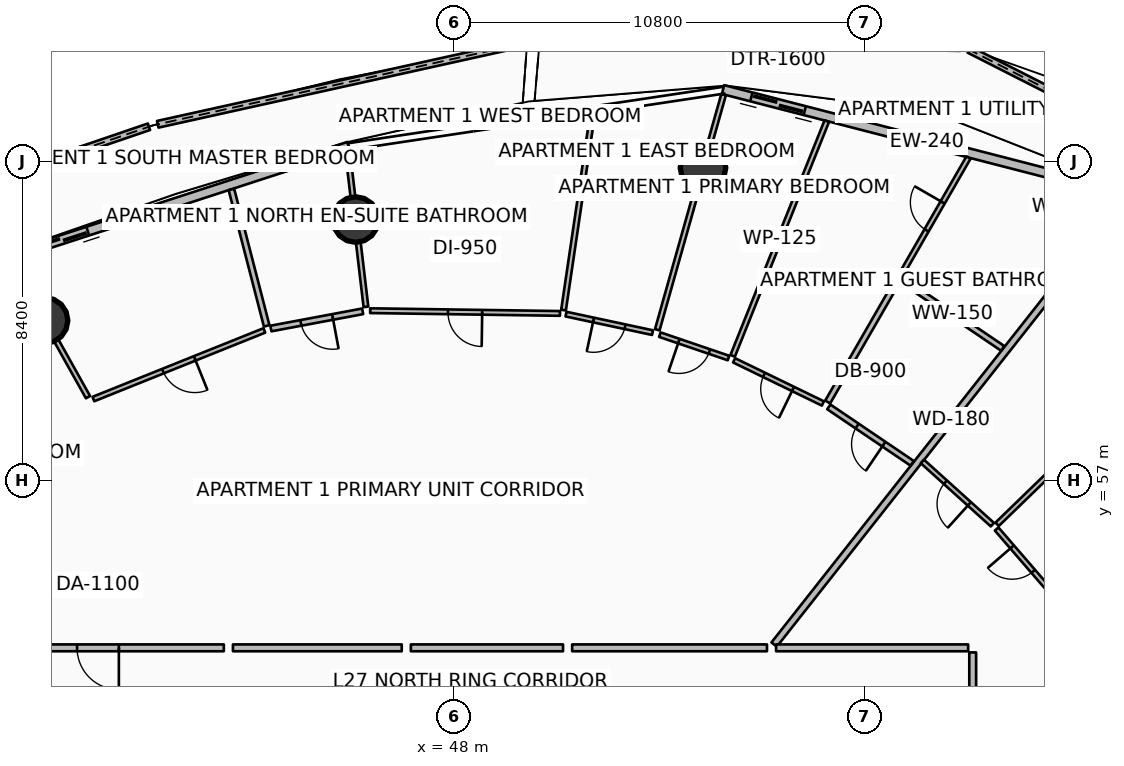
"""IFC4 building model, lengths in metres.
Left out: names, types, materials, properties, quantities, classifications, styles, units other than length and angle.
Written with IfcOpenShell. Run it as: python <this file> out.ifc"""

import sys

from ifc_helpers import new_model, si_unit, direction, frame, frame_2d, origin, origin_2d, place, context, subcontext, project, spatial, polyline, rectangle, circle, outline, extrude, element, fill, save


model = new_model("IFC4")
c1 = context("Model", 3, precision=1e-05, world=origin(), true_north=direction((0.0, 1.0)))
c2 = subcontext(c1, "Body", "Model", "MODEL_VIEW")
j1 = project(units=[si_unit("LENGTHUNIT", "METRE"), si_unit("PLANEANGLEUNIT", "RADIAN")], contexts=[c1])
p1 = place(None, origin())
s1 = spatial("IfcSite", under=j1, at=p1, CompositionType="ELEMENT")
p2 = place(p1, origin())
s2 = spatial("IfcBuilding", under=s1, at=p2, CompositionType="ELEMENT")
p3 = place(p2, frame((0.0, 0.0, 108.9)))
s3 = spatial("IfcBuildingStorey", under=s2, at=p3, CompositionType="ELEMENT", Elevation=108.9)
for number, where, z_axis, x_axis in (
    (1, (54.553, 65.234, 0.0), (0.0, 0.0, 1.0), (1.0, 0.0, 0.0)),
    (2, (45.412, 63.869, 0.0), (0.0, 0.0, 1.0), (1.0, 0.0, 0.0)),
    (3, (37.24, 61.214, 0.0), (0.0, 0.0, 1.0), (1.0, 0.0, 0.0)),
):
    element("IfcColumn", number, at=place(p3, frame(where, z_axis=z_axis, x_axis=x_axis)), inside=s3, PredefinedType="COLUMN", context=c2, shape_type="SweptSolid", body=[
        extrude(circle(Radius=0.6, at=origin_2d()), origin(), (0.0, 0.0, 1.0), 3.5),
    ])
p4 = place(p3, frame((72.201, 62.926, 0.0), z_axis=(0.0, 0.0, 1.0), x_axis=(-0.891327308183, 0.453360375074, 0.0)))
e4 = element("IfcWall", 4, at=p4, inside=s3, PredefinedType="PARAPET", context=c2, shape_type="SweptSolid", body=[
    extrude(outline(polyline([(0.0, 0.0), (11.943, 0.0), (11.942, 1.348), (5.971, 1.562), (0.0, 1.747), (0.0, 0.0)])), frame((0.0, 0.09, 0.0), z_axis=(0.0, -1.0, 0.0), x_axis=(1.0, 0.0, 0.0)), (0.0, 0.0, 1.0), 0.18),
])
p5 = place(p3, frame((49.925, 68.527, 0.0), z_axis=(0.0, 0.0, 1.0), x_axis=(-0.976378265654, -0.216068235423, 0.0)))
e5 = element("IfcWall", 5, at=p5, inside=s3, PredefinedType="PARAPET", context=c2, shape_type="SweptSolid", body=[
    extrude(outline(polyline([(0.0, 0.0), (9.955, 0.0), (9.955, 1.348), (4.977, 1.182), (0.0, 1.12), (0.0, 0.0)])), frame((0.0, 0.09, 0.0), z_axis=(0.0, -1.0, 0.0), x_axis=(1.0, 0.0, 0.0)), (0.0, 0.0, 1.0), 0.18),
])
p6 = place(p3, frame((39.975, 66.311, 0.0), z_axis=(0.0, 0.0, 1.0), x_axis=(-0.94637474678, -0.323070949881, 0.0)))
e6 = element("IfcWall", 6, at=p6, inside=s3, PredefinedType="PARAPET", context=c2, shape_type="SweptSolid", body=[
    extrude(outline(polyline([(0.0, 0.0), (10.241, 0.0), (10.241, 1.747), (5.121, 1.562), (0.0, 1.348), (0.0, 0.0)])), frame((0.0, 0.09, 0.0), z_axis=(0.0, -1.0, 0.0), x_axis=(1.0, 0.0, 0.0)), (0.0, 0.0, 1.0), 0.18),
])
p7 = place(p3, frame((65.814, 64.523, 0.0), z_axis=(0.0, 0.0, 1.0), x_axis=(-0.968356180858, 0.249572248045, 0.0)))
e7 = element("IfcWall", 7, at=p7, inside=s3, PredefinedType="SOLIDWALL", context=c2, shape_type="SweptSolid", body=[
    extrude(rectangle(XDim=11.084, YDim=0.24, at=frame_2d((5.542, 0.0))), origin(), (0.0, 0.0, 1.0), 2.45),
])
p8 = place(p7, frame((8.865, 0.0, 0.0)))
e8 = element("IfcOpeningElement", 8, at=p8, cuts=e7, PredefinedType="OPENING", context=c2, shape_type="SweptSolid", body=[
    extrude(rectangle(XDim=1.45, YDim=2.15, at=frame_2d((0.725, 1.075))), frame((0.0, 0.13, 0.0), z_axis=(0.0, -1.0, 0.0), x_axis=(1.0, 0.0, 0.0)), (0.0, 0.0, 1.0), 0.26),
])
p9 = place(p7, frame((0.28, 0.0, 0.65)))
e9 = element("IfcOpeningElement", 9, at=p9, cuts=e7, PredefinedType="OPENING", context=c2, shape_type="SweptSolid", body=[
    extrude(rectangle(XDim=1.6, YDim=1.5, at=frame_2d((0.8, 0.75))), frame((0.0, 0.13, 0.0), z_axis=(0.0, -1.0, 0.0), x_axis=(1.0, 0.0, 0.0)), (0.0, 0.0, 1.0), 0.26),
])
p10 = place(p3, frame((45.233, 65.797, 0.0), z_axis=(0.0, 0.0, 1.0), x_axis=(-0.951052494852, -0.30902937083, 0.0)))
e10 = element("IfcWall", 10, at=p10, inside=s3, PredefinedType="SOLIDWALL", context=c2, shape_type="SweptSolid", body=[
    extrude(rectangle(XDim=9.444, YDim=0.24, at=frame_2d((4.722, 0.0))), origin(), (0.0, 0.0, 1.0), 2.45),
])
p11 = place(p10, frame((7.224, 0.0, 0.0)))
e11 = element("IfcOpeningElement", 11, at=p11, cuts=e10, PredefinedType="OPENING", context=c2, shape_type="SweptSolid", body=[
    extrude(rectangle(XDim=1.45, YDim=2.15, at=frame_2d((0.725, 1.075))), frame((0.0, 0.13, 0.0), z_axis=(0.0, -1.0, 0.0), x_axis=(1.0, 0.0, 0.0)), (0.0, 0.0, 1.0), 0.26),
])
p12 = place(p10, frame((0.28, 0.0, 0.65)))
e12 = element("IfcOpeningElement", 12, at=p12, cuts=e10, PredefinedType="OPENING", context=c2, shape_type="SweptSolid", body=[
    extrude(rectangle(XDim=1.6, YDim=1.5, at=frame_2d((0.8, 0.75))), frame((0.0, 0.13, 0.0), z_axis=(0.0, -1.0, 0.0), x_axis=(1.0, 0.0, 0.0)), (0.0, 0.0, 1.0), 0.26),
])
p13 = place(p3, frame((56.425, 52.686, 0.0), z_axis=(0.0, 0.0, 1.0), x_axis=(0.619083417853, 0.785325233098, 0.0)))
e13 = element("IfcWall", 13, at=p13, inside=s3, PredefinedType="PARTITIONING", context=c2, shape_type="SweptSolid", body=[
    extrude(rectangle(XDim=15.063, YDim=0.18, at=frame_2d((7.532, 0.0))), origin(), (0.0, 0.0, 1.0), 2.94),
])
p14 = place(p3, frame((41.944, 52.6, 0.0), z_axis=(0.0, 0.0, 1.0), x_axis=(-1.0, 0.0, 0.0)))
e14 = element("IfcWall", 14, at=p14, inside=s3, PredefinedType="PARTITIONING", context=c2, shape_type="SweptSolid", body=[
    extrude(rectangle(XDim=6.624, YDim=0.18, at=frame_2d((3.312, 0.0))), origin(), (0.0, 0.0, 1.0), 2.94),
])
p15 = place(p14, frame((2.762, 0.0, 0.0)))
e15 = element("IfcOpeningElement", 15, at=p15, cuts=e14, PredefinedType="OPENING", context=c2, shape_type="SweptSolid", body=[
    extrude(rectangle(XDim=1.1, YDim=2.1, at=frame_2d((0.55, 1.05))), frame((0.0, 0.1, 0.0), z_axis=(0.0, -1.0, 0.0), x_axis=(1.0, 0.0, 0.0)), (0.0, 0.0, 1.0), 0.2),
])
p16 = place(p3, frame((56.236, 52.6, 0.0), z_axis=(0.0, 0.0, 1.0), x_axis=(-1.0, 0.0, 0.0)))
e16 = element("IfcWall", 16, at=p16, inside=s3, PredefinedType="PARTITIONING", context=c2, shape_type="SweptSolid", body=[
    extrude(rectangle(XDim=5.127, YDim=0.18, at=frame_2d((2.563, 0.0))), origin(), (0.0, 0.0, 1.0), 2.94),
])
p17 = place(p3, frame((60.057, 57.455, 0.0), z_axis=(0.0, 0.0, 1.0), x_axis=(-0.828073269886, 0.560619888783, 0.0)))
e17 = element("IfcWall", 17, at=p17, inside=s3, PredefinedType="PARTITIONING", context=c2, shape_type="SweptSolid", body=[
    extrude(rectangle(XDim=2.649, YDim=0.15, at=frame_2d((1.324, 0.0))), origin(), (0.0, 0.0, 1.0), 2.94),
])
p18 = place(p17, frame((0.899, 0.0, 0.0)))
e18 = element("IfcOpeningElement", 18, at=p18, cuts=e17, PredefinedType="OPENING", context=c2, shape_type="SweptSolid", body=[
    extrude(rectangle(XDim=0.85, YDim=2.06, at=frame_2d((0.425, 1.03))), frame((0.0, 0.085, 0.0), z_axis=(0.0, -1.0, 0.0), x_axis=(1.0, 0.0, 0.0)), (0.0, 0.0, 1.0), 0.17),
])
p19 = place(p3, frame((62.44, 60.479, 0.0), z_axis=(0.0, 0.0, 1.0), x_axis=(-0.828057808374, 0.560642725798, 0.0)))
e19 = element("IfcWall", 19, at=p19, inside=s3, PredefinedType="PARTITIONING", context=c2, shape_type="SweptSolid", body=[
    extrude(rectangle(XDim=3.206, YDim=0.15, at=frame_2d((1.603, 0.0))), origin(), (0.0, 0.0, 1.0), 2.94),
])
p20 = place(p3, frame((57.834, 59.069, 0.0), z_axis=(0.0, 0.0, 1.0), x_axis=(0.49925269443, 0.866456431164, 0.0)))
e20 = element("IfcWall", 20, at=p20, inside=s3, PredefinedType="PARTITIONING", context=c2, shape_type="SweptSolid", body=[
    extrude(rectangle(XDim=3.72, YDim=0.15, at=frame_2d((1.86, 0.0))), origin(), (0.0, 0.0, 1.0), 2.94),
])
p21 = place(p3, frame((59.756, 62.405, 0.0), z_axis=(0.0, 0.0, 1.0), x_axis=(0.499189934721, 0.866492590316, 0.0)))
e21 = element("IfcWall", 21, at=p21, inside=s3, PredefinedType="PARTITIONING", context=c2, shape_type="SweptSolid", body=[
    extrude(rectangle(XDim=3.573, YDim=0.125, at=frame_2d((1.786, 0.0))), origin(), (0.0, 0.0, 1.0), 2.94),
])
p22 = place(p21, frame((1.361, 0.0, 0.0)))
e22 = element("IfcOpeningElement", 22, at=p22, cuts=e21, PredefinedType="OPENING", context=c2, shape_type="SweptSolid", body=[
    extrude(rectangle(XDim=0.85, YDim=2.06, at=frame_2d((0.425, 1.03))), frame((0.0, 0.073, 0.0), z_axis=(0.0, -1.0, 0.0), x_axis=(1.0, 0.0, 0.0)), (0.0, 0.0, 1.0), 0.145),
])
p23 = place(p3, frame((55.333, 60.283, 0.0), z_axis=(0.0, 0.0, 1.0), x_axis=(0.372282601369, 0.928119423737, 0.0)))
e23 = element("IfcWall", 23, at=p23, inside=s3, PredefinedType="PARTITIONING", context=c2, shape_type="SweptSolid", body=[
    extrude(rectangle(XDim=6.653, YDim=0.125, at=frame_2d((3.327, 0.0))), origin(), (0.0, 0.0, 1.0), 2.94),
])
p24 = place(p3, frame((57.708, 59.03, 0.0), z_axis=(0.0, 0.0, 1.0), x_axis=(-0.899555648673, 0.436806175484, 0.0)))
e24 = element("IfcWall", 24, at=p24, inside=s3, PredefinedType="PARTITIONING", context=c2, shape_type="SweptSolid", body=[
    extrude(rectangle(XDim=2.597, YDim=0.125, at=frame_2d((1.299, 0.0))), origin(), (0.0, 0.0, 1.0), 2.94),
])
p25 = place(p24, frame((0.874, 0.0, 0.0)))
e25 = element("IfcOpeningElement", 25, at=p25, cuts=e24, PredefinedType="OPENING", context=c2, shape_type="SweptSolid", body=[
    extrude(rectangle(XDim=0.85, YDim=2.06, at=frame_2d((0.425, 1.03))), frame((0.0, 0.073, 0.0), z_axis=(0.0, -1.0, 0.0), x_axis=(1.0, 0.0, 0.0)), (0.0, 0.0, 1.0), 0.145),
])
p26 = place(p3, frame((55.224, 60.226, 0.0), z_axis=(0.0, 0.0, 1.0), x_axis=(-0.946642431702, 0.322285752866, 0.0)))
e26 = element("IfcWall", 26, at=p26, inside=s3, PredefinedType="PARTITIONING", context=c2, shape_type="SweptSolid", body=[
    extrude(rectangle(XDim=1.908, YDim=0.125, at=frame_2d((0.954, 0.0))), origin(), (0.0, 0.0, 1.0), 2.94),
])
p27 = place(p26, frame((0.529, 0.0, 0.0)))
e27 = element("IfcOpeningElement", 27, at=p27, cuts=e26, PredefinedType="OPENING", context=c2, shape_type="SweptSolid", body=[
    extrude(rectangle(XDim=0.85, YDim=2.06, at=frame_2d((0.425, 1.03))), frame((0.0, 0.073, 0.0), z_axis=(0.0, -1.0, 0.0), x_axis=(1.0, 0.0, 0.0)), (0.0, 0.0, 1.0), 0.145),
])
p28 = place(p3, frame((50.869, 52.6, 0.0), z_axis=(0.0, 0.0, 1.0), x_axis=(-1.0, 0.0, 0.0)))
e28 = element("IfcWall", 28, at=p28, inside=s3, PredefinedType="PARTITIONING", context=c2, shape_type="SweptSolid", body=[
    extrude(rectangle(XDim=4.004, YDim=0.18, at=frame_2d((2.002, 0.0))), origin(), (0.0, 0.0, 1.0), 2.94),
])
p29 = place(p3, frame((53.35, 60.969, 0.0), z_axis=(0.0, 0.0, 1.0), x_axis=(0.271449341275, 0.962452728772, 0.0)))
e29 = element("IfcWall", 29, at=p29, inside=s3, PredefinedType="PARTITIONING", context=c2, shape_type="SweptSolid", body=[
    extrude(rectangle(XDim=6.429, YDim=0.125, at=frame_2d((3.214, 0.0))), origin(), (0.0, 0.0, 1.0), 2.94),
])
p30 = place(p3, frame((50.883, 61.487, 0.0), z_axis=(0.0, 0.0, 1.0), x_axis=(0.146319984384, 0.989237313373, 0.0)))
e30 = element("IfcWall", 30, at=p30, inside=s3, PredefinedType="PARTITIONING", context=c2, shape_type="SweptSolid", body=[
    extrude(rectangle(XDim=5.301, YDim=0.125, at=frame_2d((2.65, 0.0))), origin(), (0.0, 0.0, 1.0), 2.94),
])
p31 = place(p3, frame((53.225, 60.894, 0.0), z_axis=(0.0, 0.0, 1.0), x_axis=(-0.977859146171, 0.209264163799, 0.0)))
e31 = element("IfcWall", 31, at=p31, inside=s3, PredefinedType="PARTITIONING", context=c2, shape_type="SweptSolid", body=[
    extrude(rectangle(XDim=2.329, YDim=0.125, at=frame_2d((1.164, 0.0))), origin(), (0.0, 0.0, 1.0), 2.94),
])
p32 = place(p31, frame((0.739, 0.0, 0.0)))
e32 = element("IfcOpeningElement", 32, at=p32, cuts=e31, PredefinedType="OPENING", context=c2, shape_type="SweptSolid", body=[
    extrude(rectangle(XDim=0.85, YDim=2.06, at=frame_2d((0.425, 1.03))), frame((0.0, 0.073, 0.0), z_axis=(0.0, -1.0, 0.0), x_axis=(1.0, 0.0, 0.0)), (0.0, 0.0, 1.0), 0.145),
])
p33 = place(p3, frame((50.79, 61.399, 0.0), z_axis=(0.0, 0.0, 1.0), x_axis=(-0.999894626753, 0.014516727973, 0.0)))
e33 = element("IfcWall", 33, at=p33, inside=s3, PredefinedType="PARTITIONING", context=c2, shape_type="SweptSolid", body=[
    extrude(rectangle(XDim=4.995, YDim=0.125, at=frame_2d((2.498, 0.0))), origin(), (0.0, 0.0, 1.0), 2.94),
])
p34 = place(p33, frame((2.048, 0.0, 0.0)))
e34 = element("IfcOpeningElement", 34, at=p34, cuts=e33, PredefinedType="OPENING", context=c2, shape_type="SweptSolid", body=[
    extrude(rectangle(XDim=0.9, YDim=2.08, at=frame_2d((0.45, 1.04))), frame((0.0, 0.073, 0.0), z_axis=(0.0, -1.0, 0.0), x_axis=(1.0, 0.0, 0.0)), (0.0, 0.0, 1.0), 0.145),
])
p35 = place(p3, frame((46.625, 52.6, 0.0), z_axis=(0.0, 0.0, 1.0), x_axis=(-1.0, 0.0, 0.0)))
e35 = element("IfcWall", 35, at=p35, inside=s3, PredefinedType="PARTITIONING", context=c2, shape_type="SweptSolid", body=[
    extrude(rectangle(XDim=4.442, YDim=0.18, at=frame_2d((2.221, 0.0))), origin(), (0.0, 0.0, 1.0), 2.94),
])
p36 = place(p3, frame((45.683, 61.573, 0.0), z_axis=(0.0, 0.0, 1.0), x_axis=(-0.117513626782, 0.993071270111, 0.0)))
e36 = element("IfcWall", 36, at=p36, inside=s3, PredefinedType="PARTITIONING", context=c2, shape_type="SweptSolid", body=[
    extrude(rectangle(XDim=4.213, YDim=0.125, at=frame_2d((2.107, 0.0))), origin(), (0.0, 0.0, 1.0), 2.94),
])
p37 = place(p3, frame((38.37, 59.196, 0.0), z_axis=(0.0, 0.0, 1.0), x_axis=(-0.488603368932, 0.87250601595, 0.0)))
e37 = element("IfcWall", 37, at=p37, inside=s3, PredefinedType="PARTITIONING", context=c2, shape_type="SweptSolid", body=[
    extrude(rectangle(XDim=4.113, YDim=0.125, at=frame_2d((2.057, 0.0))), origin(), (0.0, 0.0, 1.0), 2.94),
])
p38 = place(p3, frame((45.597, 61.455, 0.0), z_axis=(0.0, 0.0, 1.0), x_axis=(-0.982882310082, -0.18423453674, 0.0)))
e38 = element("IfcWall", 38, at=p38, inside=s3, PredefinedType="PARTITIONING", context=c2, shape_type="SweptSolid", body=[
    extrude(rectangle(XDim=2.457, YDim=0.15, at=frame_2d((1.229, 0.0))), origin(), (0.0, 0.0, 1.0), 2.94),
])
p39 = place(p38, frame((0.803, 0.0, 0.0)))
e39 = element("IfcOpeningElement", 39, at=p39, cuts=e38, PredefinedType="OPENING", context=c2, shape_type="SweptSolid", body=[
    extrude(rectangle(XDim=0.85, YDim=2.06, at=frame_2d((0.425, 1.03))), frame((0.0, 0.085, 0.0), z_axis=(0.0, -1.0, 0.0), x_axis=(1.0, 0.0, 0.0)), (0.0, 0.0, 1.0), 0.17),
])
p40 = place(p3, frame((43.071, 61.073, 0.0), z_axis=(0.0, 0.0, 1.0), x_axis=(-0.250228515302, 0.968186805389, 0.0)))
e40 = element("IfcWall", 40, at=p40, inside=s3, PredefinedType="PARTITIONING", context=c2, shape_type="SweptSolid", body=[
    extrude(rectangle(XDim=3.708, YDim=0.15, at=frame_2d((1.854, 0.0))), origin(), (0.0, 0.0, 1.0), 2.94),
])
p41 = place(p3, frame((43.01, 60.952, 0.0), z_axis=(0.0, 0.0, 1.0), x_axis=(-0.9280140097, -0.372545296307, 0.0)))
e41 = element("IfcWall", 41, at=p41, inside=s3, PredefinedType="PARTITIONING", context=c2, shape_type="SweptSolid", body=[
    extrude(rectangle(XDim=4.847, YDim=0.125, at=frame_2d((2.424, 0.0))), origin(), (0.0, 0.0, 1.0), 2.94),
])
p42 = place(p41, frame((1.974, 0.0, 0.0)))
e42 = element("IfcOpeningElement", 42, at=p42, cuts=e41, PredefinedType="OPENING", context=c2, shape_type="SweptSolid", body=[
    extrude(rectangle(XDim=0.9, YDim=2.08, at=frame_2d((0.45, 1.04))), frame((0.0, 0.073, 0.0), z_axis=(0.0, -1.0, 0.0), x_axis=(1.0, 0.0, 0.0)), (0.0, 0.0, 1.0), 0.145),
])
p43 = place(p3, frame((61.65, 49.764, 0.0), z_axis=(0.0, 0.0, 1.0), x_axis=(0.0, 1.0, 0.0)))
e43 = element("IfcWall", 43, at=p43, inside=s3, PredefinedType="PARTITIONING", context=c2, shape_type="SweptSolid", body=[
    extrude(rectangle(XDim=2.716, YDim=0.18, at=frame_2d((1.358, 0.0))), origin(), (0.0, 0.0, 1.0), 2.94),
])
p44 = place(p3, frame((61.53, 52.6, 0.0), z_axis=(0.0, 0.0, 1.0), x_axis=(-1.0, 0.0, 0.0)))
e44 = element("IfcWall", 44, at=p44, inside=s3, PredefinedType="PARTITIONING", context=c2, shape_type="SweptSolid", body=[
    extrude(rectangle(XDim=5.054, YDim=0.18, at=frame_2d((2.527, 0.0))), origin(), (0.0, 0.0, 1.0), 2.94),
])
p45 = place(p3, frame((62.292, 55.85, 0.0), z_axis=(0.0, 0.0, 1.0), x_axis=(0.718126885769, 0.695912189817, 0.0)))
e45 = element("IfcWall", 45, at=p45, inside=s3, PredefinedType="PARTITIONING", context=c2, shape_type="SweptSolid", body=[
    extrude(rectangle(XDim=8.781, YDim=0.125, at=frame_2d((4.391, 0.0))), origin(), (0.0, 0.0, 1.0), 2.94),
])
p46 = place(p3, frame((63.65, 54.142, 0.0), z_axis=(0.0, 0.0, 1.0), x_axis=(-0.65397173696, 0.756518980104, 0.0)))
e46 = element("IfcWall", 46, at=p46, inside=s3, PredefinedType="PARTITIONING", context=c2, shape_type="SweptSolid", body=[
    extrude(rectangle(XDim=2.095, YDim=0.125, at=frame_2d((1.047, 0.0))), origin(), (0.0, 0.0, 1.0), 2.94),
])
p47 = place(p46, frame((0.623, 0.0, 0.0)))
e47 = element("IfcOpeningElement", 47, at=p47, cuts=e46, PredefinedType="OPENING", context=c2, shape_type="SweptSolid", body=[
    extrude(rectangle(XDim=0.85, YDim=2.06, at=frame_2d((0.425, 1.03))), frame((0.0, 0.073, 0.0), z_axis=(0.0, -1.0, 0.0), x_axis=(1.0, 0.0, 0.0)), (0.0, 0.0, 1.0), 0.145),
])
p48 = place(p3, frame((62.168, 55.841, 0.0), z_axis=(0.0, 0.0, 1.0), x_axis=(-0.742266682882, 0.67010459742, 0.0)))
e48 = element("IfcWall", 48, at=p48, inside=s3, PredefinedType="PARTITIONING", context=c2, shape_type="SweptSolid", body=[
    extrude(rectangle(XDim=2.483, YDim=0.125, at=frame_2d((1.242, 0.0))), origin(), (0.0, 0.0, 1.0), 2.94),
])
p49 = place(p48, frame((0.817, 0.0, 0.0)))
e49 = element("IfcOpeningElement", 49, at=p49, cuts=e48, PredefinedType="OPENING", context=c2, shape_type="SweptSolid", body=[
    extrude(rectangle(XDim=0.85, YDim=2.06, at=frame_2d((0.425, 1.03))), frame((0.0, 0.073, 0.0), z_axis=(0.0, -1.0, 0.0), x_axis=(1.0, 0.0, 0.0)), (0.0, 0.0, 1.0), 0.145),
])
p50 = place(p8, origin())
e50 = element("IfcDoor", 50, at=p50, inside=s3, OperationType="DOUBLE_DOOR_SLIDING", PredefinedType="DOOR", context=c2, shape_type="SweptSolid", body=[
    extrude(rectangle(XDim=1.45, YDim=2.15, at=frame_2d((0.725, 1.075))), frame((0.0, 0.025, 0.0), z_axis=(0.0, -1.0, 0.0), x_axis=(1.0, 0.0, 0.0)), (0.0, 0.0, 1.0), 0.05),
])
fill(e8, e50)
p51 = place(p11, origin())
e51 = element("IfcDoor", 51, at=p51, inside=s3, OperationType="DOUBLE_DOOR_SLIDING", PredefinedType="DOOR", context=c2, shape_type="SweptSolid", body=[
    extrude(rectangle(XDim=1.45, YDim=2.15, at=frame_2d((0.725, 1.075))), frame((0.0, 0.025, 0.0), z_axis=(0.0, -1.0, 0.0), x_axis=(1.0, 0.0, 0.0)), (0.0, 0.0, 1.0), 0.05),
])
fill(e11, e51)
p52 = place(p12, origin())
e52 = element("IfcWindow", 52, at=p52, inside=s3, PartitioningType="SINGLE_PANEL", PredefinedType="WINDOW", context=c2, shape_type="SweptSolid", body=[
    extrude(rectangle(XDim=1.6, YDim=1.5, at=frame_2d((0.8, 0.75))), frame((0.0, 0.03, 0.0), z_axis=(0.0, -1.0, 0.0), x_axis=(1.0, 0.0, 0.0)), (0.0, 0.0, 1.0), 0.06),
])
fill(e12, e52)
p53 = place(p15, origin())
e53 = element("IfcDoor", 53, at=p53, inside=s3, OperationType="SINGLE_SWING_LEFT", PredefinedType="DOOR", context=c2, shape_type="SweptSolid", body=[
    extrude(rectangle(XDim=1.1, YDim=2.1, at=frame_2d((0.55, 1.05))), frame((0.0, 0.025, 0.0), z_axis=(0.0, -1.0, 0.0), x_axis=(1.0, 0.0, 0.0)), (0.0, 0.0, 1.0), 0.05),
])
fill(e15, e53)
p54 = place(p18, origin())
e54 = element("IfcDoor", 54, at=p54, inside=s3, OperationType="SINGLE_SWING_LEFT", PredefinedType="DOOR", context=c2, shape_type="SweptSolid", body=[
    extrude(rectangle(XDim=0.85, YDim=2.06, at=frame_2d((0.425, 1.03))), frame((0.0, 0.025, 0.0), z_axis=(0.0, -1.0, 0.0), x_axis=(1.0, 0.0, 0.0)), (0.0, 0.0, 1.0), 0.05),
])
fill(e18, e54)
p55 = place(p22, origin())
e55 = element("IfcDoor", 55, at=p55, inside=s3, OperationType="SINGLE_SWING_RIGHT", PredefinedType="DOOR", context=c2, shape_type="SweptSolid", body=[
    extrude(rectangle(XDim=0.85, YDim=2.06, at=frame_2d((0.425, 1.03))), frame((0.0, 0.025, 0.0), z_axis=(0.0, -1.0, 0.0), x_axis=(1.0, 0.0, 0.0)), (0.0, 0.0, 1.0), 0.05),
])
fill(e22, e55)
p56 = place(p25, origin())
e56 = element("IfcDoor", 56, at=p56, inside=s3, OperationType="SINGLE_SWING_LEFT", PredefinedType="DOOR", context=c2, shape_type="SweptSolid", body=[
    extrude(rectangle(XDim=0.85, YDim=2.06, at=frame_2d((0.425, 1.03))), frame((0.0, 0.025, 0.0), z_axis=(0.0, -1.0, 0.0), x_axis=(1.0, 0.0, 0.0)), (0.0, 0.0, 1.0), 0.05),
])
fill(e25, e56)
p57 = place(p27, origin())
e57 = element("IfcDoor", 57, at=p57, inside=s3, OperationType="SINGLE_SWING_RIGHT", PredefinedType="DOOR", context=c2, shape_type="SweptSolid", body=[
    extrude(rectangle(XDim=0.85, YDim=2.06, at=frame_2d((0.425, 1.03))), frame((0.0, 0.025, 0.0), z_axis=(0.0, -1.0, 0.0), x_axis=(1.0, 0.0, 0.0)), (0.0, 0.0, 1.0), 0.05),
])
fill(e27, e57)
p58 = place(p32, origin())
e58 = element("IfcDoor", 58, at=p58, inside=s3, OperationType="SINGLE_SWING_RIGHT", PredefinedType="DOOR", context=c2, shape_type="SweptSolid", body=[
    extrude(rectangle(XDim=0.85, YDim=2.06, at=frame_2d((0.425, 1.03))), frame((0.0, 0.025, 0.0), z_axis=(0.0, -1.0, 0.0), x_axis=(1.0, 0.0, 0.0)), (0.0, 0.0, 1.0), 0.05),
])
fill(e32, e58)
p59 = place(p34, origin())
e59 = element("IfcDoor", 59, at=p59, inside=s3, OperationType="SINGLE_SWING_LEFT", PredefinedType="DOOR", context=c2, shape_type="SweptSolid", body=[
    extrude(rectangle(XDim=0.9, YDim=2.08, at=frame_2d((0.45, 1.04))), frame((0.0, 0.025, 0.0), z_axis=(0.0, -1.0, 0.0), x_axis=(1.0, 0.0, 0.0)), (0.0, 0.0, 1.0), 0.05),
])
fill(e34, e59)
p60 = place(p39, origin())
e60 = element("IfcDoor", 60, at=p60, inside=s3, OperationType="SINGLE_SWING_LEFT", PredefinedType="DOOR", context=c2, shape_type="SweptSolid", body=[
    extrude(rectangle(XDim=0.85, YDim=2.06, at=frame_2d((0.425, 1.03))), frame((0.0, 0.025, 0.0), z_axis=(0.0, -1.0, 0.0), x_axis=(1.0, 0.0, 0.0)), (0.0, 0.0, 1.0), 0.05),
])
fill(e39, e60)
p61 = place(p42, origin())
e61 = element("IfcDoor", 61, at=p61, inside=s3, OperationType="SINGLE_SWING_LEFT", PredefinedType="DOOR", context=c2, shape_type="SweptSolid", body=[
    extrude(rectangle(XDim=0.9, YDim=2.08, at=frame_2d((0.45, 1.04))), frame((0.0, 0.025, 0.0), z_axis=(0.0, -1.0, 0.0), x_axis=(1.0, 0.0, 0.0)), (0.0, 0.0, 1.0), 0.05),
])
fill(e42, e61)
p62 = place(p47, origin())
e62 = element("IfcDoor", 62, at=p62, inside=s3, OperationType="SINGLE_SWING_RIGHT", PredefinedType="DOOR", context=c2, shape_type="SweptSolid", body=[
    extrude(rectangle(XDim=0.85, YDim=2.06, at=frame_2d((0.425, 1.03))), frame((0.0, 0.025, 0.0), z_axis=(0.0, -1.0, 0.0), x_axis=(1.0, 0.0, 0.0)), (0.0, 0.0, 1.0), 0.05),
])
fill(e47, e62)
p63 = place(p49, origin())
e63 = element("IfcDoor", 63, at=p63, inside=s3, OperationType="SINGLE_SWING_LEFT", PredefinedType="DOOR", context=c2, shape_type="SweptSolid", body=[
    extrude(rectangle(XDim=0.85, YDim=2.06, at=frame_2d((0.425, 1.03))), frame((0.0, 0.025, 0.0), z_axis=(0.0, -1.0, 0.0), x_axis=(1.0, 0.0, 0.0)), (0.0, 0.0, 1.0), 0.05),
])
fill(e49, e63)
save(model, sys.argv[1])
